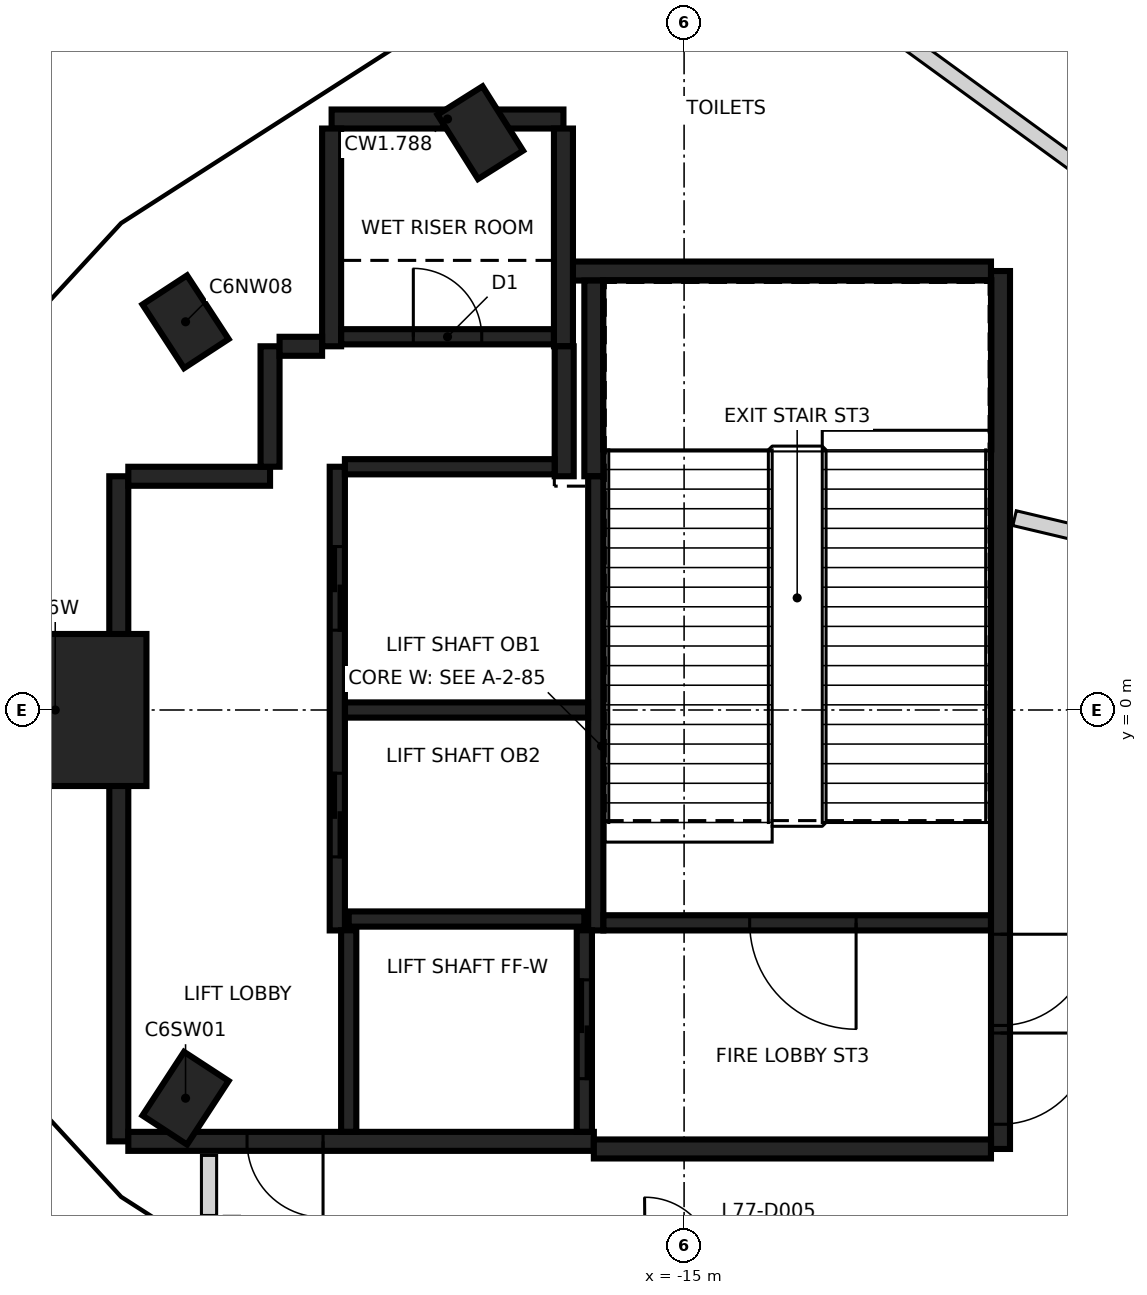
"""IFC4 building model, lengths in metres.
Left out: names, types, materials, properties, quantities, classifications, styles, units other than length and angle.
Written with IfcOpenShell. Run it as: python <this file> out.ifc"""

import sys

from ifc_helpers import new_model, si_unit, direction, frame, frame_2d, origin, origin_2d, place, context, subcontext, project, spatial, rectangle, extrude, element, fill, save


model = new_model("IFC4")
c1 = context("Model", 3, precision=1e-05, world=origin(), true_north=direction((0.0, 1.0)))
c2 = subcontext(c1, "Body", "Model", "MODEL_VIEW")
j1 = project(units=[si_unit("LENGTHUNIT", "METRE"), si_unit("PLANEANGLEUNIT", "RADIAN")], contexts=[c1])
p1 = place(None, origin())
s1 = spatial("IfcSite", under=j1, at=p1, CompositionType="ELEMENT")
p2 = place(p1, origin())
s2 = spatial("IfcBuilding", under=s1, at=p2, CompositionType="ELEMENT")
p3 = place(p2, frame((0.0, 0.0, 306.6)))
s3 = spatial("IfcBuildingStorey", under=s2, at=p3, CompositionType="ELEMENT", Elevation=306.6)
for number, where, z_axis, x_axis in (
    (1, (-17.681, 7.595, -0.35), (0.0, 0.0, 1.0), (-0.533, 0.846, 0.0)),
    (2, (-21.559, 5.107, -0.35), (0.0, 0.0, 1.0), (-0.547, 0.837, 0.0)),
    (3, (-21.559, -5.107, -0.35), (0.0, 0.0, 1.0), (0.547, 0.837, 0.0)),
):
    element("IfcColumn", number, at=place(p3, frame(where, z_axis=z_axis, x_axis=x_axis)), inside=s3, PredefinedType="COLUMN", context=c2, shape_type="SweptSolid", body=[
        extrude(rectangle(XDim=1.0, YDim=0.7, at=origin_2d()), origin(), (0.0, 0.0, 1.0), 6.0),
    ])
p4 = place(p3, frame((-23.273, 0.0, -0.35), z_axis=(0.0, 0.0, 1.0), x_axis=(1.0, 0.0, 0.0)))
e4 = element("IfcColumn", 4, at=p4, inside=s3, PredefinedType="COLUMN", context=c2, shape_type="SweptSolid", body=[
    extrude(rectangle(XDim=2.4, YDim=2.0, at=origin_2d()), origin(), (0.0, 0.0, 1.0), 6.0),
])
p5 = place(p3, frame((-10.837, 5.775, 0.0), z_axis=(0.0, 0.0, 1.0), x_axis=(0.0, -1.0, 0.0)))
e5 = element("IfcWall", 5, at=p5, inside=s3, PredefinedType="SHEAR", context=c2, shape_type="SweptSolid", body=[
    extrude(rectangle(XDim=11.55, YDim=0.25, at=frame_2d((5.775, 0.0))), origin(), (0.0, 0.0, 1.0), 5.65),
])
p6 = place(p5, frame((10.025, 0.0, 0.0)))
e6 = element("IfcOpeningElement", 6, at=p6, cuts=e5, PredefinedType="OPENING", context=c2, shape_type="SweptSolid", body=[
    extrude(rectangle(XDim=1.2, YDim=2.1, at=frame_2d((0.6, 1.05))), frame((0.0, 0.135, 0.0), z_axis=(0.0, -1.0, 0.0), x_axis=(1.0, 0.0, 0.0)), (0.0, 0.0, 1.0), 0.27),
])
p7 = place(p5, frame((8.725, 0.0, 0.0)))
e7 = element("IfcOpeningElement", 7, at=p7, cuts=e5, PredefinedType="OPENING", context=c2, shape_type="SweptSolid", body=[
    extrude(rectangle(XDim=1.2, YDim=2.1, at=frame_2d((0.6, 1.05))), frame((0.0, 0.135, 0.0), z_axis=(0.0, -1.0, 0.0), x_axis=(1.0, 0.0, 0.0)), (0.0, 0.0, 1.0), 0.27),
])
p8 = place(p3, frame((-22.437, -5.675, 0.0), z_axis=(0.0, 0.0, 1.0), x_axis=(0.0, 1.0, 0.0)))
e8 = element("IfcWall", 8, at=p8, inside=s3, PredefinedType="SHEAR", context=c2, shape_type="SweptSolid", body=[
    extrude(rectangle(XDim=8.75, YDim=0.25, at=frame_2d((4.375, 0.0))), origin(), (0.0, 0.0, 1.0), 5.65),
])
p9 = place(p3, frame((-16.187, -5.675, 0.0), z_axis=(0.0, 0.0, 1.0), x_axis=(-1.0, 0.0, 0.0)))
e9 = element("IfcWall", 9, at=p9, inside=s3, PredefinedType="SHEAR", context=c2, shape_type="SweptSolid", body=[
    extrude(rectangle(XDim=6.125, YDim=0.25, at=frame_2d((3.062, 0.0))), origin(), (0.0, 0.0, 1.0), 5.65),
])
p10 = place(p9, frame((3.563, 0.0, 0.0)))
e10 = element("IfcOpeningElement", 10, at=p10, cuts=e9, PredefinedType="OPENING", context=c2, shape_type="SweptSolid", body=[
    extrude(rectangle(XDim=1.0, YDim=2.1, at=frame_2d((0.5, 1.05))), frame((0.0, 0.135, 0.0), z_axis=(0.0, -1.0, 0.0), x_axis=(1.0, 0.0, 0.0)), (0.0, 0.0, 1.0), 0.27),
])
p11 = place(p3, frame((-10.963, -5.775, 0.0), z_axis=(0.0, 0.0, 1.0), x_axis=(-1.0, 0.0, 0.0)))
e11 = element("IfcWall", 11, at=p11, inside=s3, PredefinedType="SHEAR", context=c2, shape_type="SweptSolid", body=[
    extrude(rectangle(XDim=5.225, YDim=0.25, at=frame_2d((2.612, 0.0))), origin(), (0.0, 0.0, 1.0), 5.65),
])
p12 = place(p3, frame((-16.472, 5.775, 0.0), z_axis=(0.0, 0.0, 1.0), x_axis=(1.0, 0.0, 0.0)))
e12 = element("IfcWall", 12, at=p12, inside=s3, PredefinedType="SHEAR", context=c2, shape_type="SweptSolid", body=[
    extrude(rectangle(XDim=5.51, YDim=0.25, at=frame_2d((2.755, 0.0))), origin(), (0.0, 0.0, 1.0), 5.65),
])
p13 = place(p3, frame((-19.637, 7.775, 0.0), z_axis=(0.0, 0.0, 1.0), x_axis=(1.0, 0.0, 0.0)))
e13 = element("IfcWall", 13, at=p13, inside=s3, PredefinedType="SHEAR", context=c2, shape_type="SweptSolid", body=[
    extrude(rectangle(XDim=3.05, YDim=0.25, at=frame_2d((1.525, 0.0))), origin(), (0.0, 0.0, 1.0), 5.65),
])
for number, where, z_axis, x_axis in (
    (14, (-16.587, 7.65, 0.0), (0.0, 0.0, 1.0), (0.0, -1.0, 0.0)),
    (15, (-19.637, 4.785, 0.0), (0.0, 0.0, 1.0), (0.0, 1.0, 0.0)),
):
    element("IfcWall", number, at=place(p3, frame(where, z_axis=z_axis, x_axis=x_axis)), inside=s3, PredefinedType="SHEAR", context=c2, shape_type="SweptSolid", body=[
        extrude(rectangle(XDim=2.865, YDim=0.25, at=frame_2d((1.432, 0.0))), origin(), (0.0, 0.0, 1.0), 5.65),
    ])
p14 = place(p3, frame((-16.187, 3.075, 0.0), z_axis=(0.0, 0.0, 1.0), x_axis=(0.0, 1.0, 0.0)))
e16 = element("IfcWall", 16, at=p14, inside=s3, PredefinedType="SHEAR", context=c2, shape_type="SweptSolid", body=[
    extrude(rectangle(XDim=2.575, YDim=0.25, at=frame_2d((1.287, 0.0))), origin(), (0.0, 0.0, 1.0), 5.65),
])
p15 = place(p3, frame((-22.312, 3.075, 0.0), z_axis=(0.0, 0.0, 1.0), x_axis=(1.0, 0.0, 0.0)))
e17 = element("IfcWall", 17, at=p15, inside=s3, PredefinedType="SHEAR", context=c2, shape_type="SweptSolid", body=[
    extrude(rectangle(XDim=1.865, YDim=0.25, at=frame_2d((0.932, 0.0))), origin(), (0.0, 0.0, 1.0), 5.65),
])
p16 = place(p3, frame((-16.577, 4.785, 0.0), z_axis=(0.0, 0.0, 1.0), x_axis=(0.0, -1.0, 0.0)))
e18 = element("IfcWall", 18, at=p16, inside=s3, PredefinedType="SHEAR", context=c2, shape_type="SweptSolid", body=[
    extrude(rectangle(XDim=1.71, YDim=0.25, at=frame_2d((0.855, 0.0))), origin(), (0.0, 0.0, 1.0), 5.65),
])
p17 = place(p3, frame((-20.447, 3.2, 0.0), z_axis=(0.0, 0.0, 1.0), x_axis=(0.0, 1.0, 0.0)))
e19 = element("IfcWall", 19, at=p17, inside=s3, PredefinedType="SHEAR", context=c2, shape_type="SweptSolid", body=[
    extrude(rectangle(XDim=1.584, YDim=0.25, at=frame_2d((0.792, 0.0))), origin(), (0.0, 0.0, 1.0), 5.65),
])
p18 = place(p3, frame((-20.322, 4.785, 0.0), z_axis=(0.0, 0.0, 1.0), x_axis=(1.0, 0.0, 0.0)))
e20 = element("IfcWall", 20, at=p18, inside=s3, PredefinedType="SHEAR", context=c2, shape_type="SweptSolid", body=[
    extrude(rectangle(XDim=0.559, YDim=0.25, at=frame_2d((0.28, 0.0))), origin(), (0.0, 0.0, 1.0), 5.65),
])
p19 = place(p3, frame((-16.162, 3.074, 0.0), z_axis=(0.0, 0.0, 1.0), x_axis=(0.0, -1.0, 0.0)))
e21 = element("IfcWall", 21, at=p19, inside=s3, PredefinedType="SHEAR", context=c2, shape_type="SweptSolid", body=[
    extrude(rectangle(XDim=5.974, YDim=0.2, at=frame_2d((2.987, 0.0))), origin(), (0.0, 0.0, 1.0), 5.65),
])
p20 = place(p3, frame((-19.562, -2.9, 0.0), z_axis=(0.0, 0.0, 1.0), x_axis=(0.0, 1.0, 0.0)))
e22 = element("IfcWall", 22, at=p20, inside=s3, PredefinedType="SHEAR", context=c2, shape_type="SweptSolid", body=[
    extrude(rectangle(XDim=6.1, YDim=0.2, at=frame_2d((3.05, 0.0))), origin(), (0.0, 0.0, 1.0), 5.65),
])
p21 = place(p20, frame((3.95, 0.0, 0.0)))
e23 = element("IfcOpeningElement", 23, at=p21, cuts=e22, PredefinedType="OPENING", context=c2, shape_type="SweptSolid", body=[
    extrude(rectangle(XDim=1.1, YDim=2.1, at=frame_2d((0.55, 1.05))), frame((0.0, 0.11, 0.0), z_axis=(0.0, -1.0, 0.0), x_axis=(1.0, 0.0, 0.0)), (0.0, 0.0, 1.0), 0.22),
])
p22 = place(p20, frame((0.968, 0.0, 0.0)))
e24 = element("IfcOpeningElement", 24, at=p22, cuts=e22, PredefinedType="OPENING", context=c2, shape_type="SweptSolid", body=[
    extrude(rectangle(XDim=1.1, YDim=2.1, at=frame_2d((0.55, 1.05))), frame((0.0, 0.11, 0.0), z_axis=(0.0, -1.0, 0.0), x_axis=(1.0, 0.0, 0.0)), (0.0, 0.0, 1.0), 0.22),
])
p23 = place(p3, frame((-10.963, -2.8, 0.0), z_axis=(0.0, 0.0, 1.0), x_axis=(-1.0, 0.0, 0.0)))
e25 = element("IfcWall", 25, at=p23, inside=s3, PredefinedType="SHEAR", context=c2, shape_type="SweptSolid", body=[
    extrude(rectangle(XDim=5.098, YDim=0.2, at=frame_2d((2.549, 0.0))), origin(), (0.0, 0.0, 1.0), 5.65),
])
p24 = place(p23, frame((1.774, 0.0, 0.0)))
e26 = element("IfcOpeningElement", 26, at=p24, cuts=e25, PredefinedType="OPENING", context=c2, shape_type="SweptSolid", body=[
    extrude(rectangle(XDim=1.4, YDim=2.1, at=frame_2d((0.7, 1.05))), frame((0.0, 0.11, 0.0), z_axis=(0.0, -1.0, 0.0), x_axis=(1.0, 0.0, 0.0)), (0.0, 0.0, 1.0), 0.22),
])
p25 = place(p3, frame((-16.263, 0.0, 0.0), z_axis=(0.0, 0.0, 1.0), x_axis=(-1.0, 0.0, 0.0)))
e27 = element("IfcWall", 27, at=p25, inside=s3, PredefinedType="SHEAR", context=c2, shape_type="SweptSolid", body=[
    extrude(rectangle(XDim=3.198, YDim=0.2, at=frame_2d((1.599, 0.0))), origin(), (0.0, 0.0, 1.0), 5.65),
])
p26 = place(p3, frame((-19.511, 4.91, 0.0), z_axis=(0.0, 0.0, 1.0), x_axis=(1.0, 0.0, 0.0)))
e28 = element("IfcWall", 28, at=p26, inside=s3, PredefinedType="SHEAR", context=c2, shape_type="SweptSolid", body=[
    extrude(rectangle(XDim=2.798, YDim=0.2, at=frame_2d((1.399, 0.0))), origin(), (0.0, 0.0, 1.0), 5.65),
])
p27 = place(p26, frame((0.949, 0.0, 0.0)))
e29 = element("IfcOpeningElement", 29, at=p27, cuts=e28, PredefinedType="OPENING", context=c2, shape_type="SweptSolid", body=[
    extrude(rectangle(XDim=0.9, YDim=2.1, at=frame_2d((0.45, 1.05))), frame((0.0, 0.11, 0.0), z_axis=(0.0, -1.0, 0.0), x_axis=(1.0, 0.0, 0.0)), (0.0, 0.0, 1.0), 0.22),
])
p28 = place(p3, frame((-19.462, 3.2, 0.0), z_axis=(0.0, 0.0, 1.0), x_axis=(1.0, 0.0, 0.0)))
e30 = element("IfcWall", 30, at=p28, inside=s3, PredefinedType="SHEAR", context=c2, shape_type="SweptSolid", body=[
    extrude(rectangle(XDim=2.759, YDim=0.2, at=frame_2d((1.379, 0.0))), origin(), (0.0, 0.0, 1.0), 5.65),
])
p29 = place(p3, frame((-19.412, -2.75, 0.0), z_axis=(0.0, 0.0, 1.0), x_axis=(1.0, 0.0, 0.0)))
e31 = element("IfcWall", 31, at=p29, inside=s3, PredefinedType="SHEAR", context=c2, shape_type="SweptSolid", body=[
    extrude(rectangle(XDim=3.1, YDim=0.2, at=frame_2d((1.55, 0.0))), origin(), (0.0, 0.0, 1.0), 5.65),
])
p30 = place(p3, frame((-16.312, -2.898, 0.0), z_axis=(0.0, 0.0, 1.0), x_axis=(0.0, -1.0, 0.0)))
e32 = element("IfcWall", 32, at=p30, inside=s3, PredefinedType="SHEAR", context=c2, shape_type="SweptSolid", body=[
    extrude(rectangle(XDim=2.651, YDim=0.2, at=frame_2d((1.325, 0.0))), origin(), (0.0, 0.0, 1.0), 5.65),
])
p31 = place(p30, frame((0.652, 0.0, 0.0)))
e33 = element("IfcOpeningElement", 33, at=p31, cuts=e32, PredefinedType="OPENING", context=c2, shape_type="SweptSolid", body=[
    extrude(rectangle(XDim=1.3, YDim=2.1, at=frame_2d((0.65, 1.05))), frame((0.0, 0.11, 0.0), z_axis=(0.0, -1.0, 0.0), x_axis=(1.0, 0.0, 0.0)), (0.0, 0.0, 1.0), 0.22),
])
p32 = place(p3, frame((-19.412, -5.549, 0.0), z_axis=(0.0, 0.0, 1.0), x_axis=(0.0, 1.0, 0.0)))
e34 = element("IfcWall", 34, at=p32, inside=s3, PredefinedType="SHEAR", context=c2, shape_type="SweptSolid", body=[
    extrude(rectangle(XDim=2.651, YDim=0.2, at=frame_2d((1.325, 0.0))), origin(), (0.0, 0.0, 1.0), 5.65),
])
p33 = place(p3, frame((-21.25, -6.65, 0.0), z_axis=(0.0, 0.0, 1.0), x_axis=(0.0, 1.0, 0.0)))
e35 = element("IfcWall", 35, at=p33, inside=s3, PredefinedType="PARTITIONING", context=c2, shape_type="SweptSolid", body=[
    extrude(rectangle(XDim=0.79, YDim=0.2, at=frame_2d((0.395, 0.0))), origin(), (0.0, 0.0, 1.0), 5.65),
])
p34 = place(p3, frame((-15.114, 11.004, 0.0), z_axis=(0.0, 0.0, 1.0), x_axis=(0.808410288659, -0.58861940606, 0.0)))
e36 = element("IfcWall", 36, at=p34, inside=s3, PredefinedType="PARTITIONING", context=c2, shape_type="SweptSolid", body=[
    extrude(rectangle(XDim=14.782, YDim=0.2, at=frame_2d((7.391, 0.0))), origin(), (0.0, 0.0, 1.0), 5.65),
])
p35 = place(p3, frame((-10.78, -13.609, 0.0), z_axis=(0.0, 0.0, 1.0), x_axis=(0.620923442864, 0.783871212702, 0.0)))
e37 = element("IfcWall", 37, at=p35, inside=s3, PredefinedType="PARTITIONING", context=c2, shape_type="SweptSolid", body=[
    extrude(rectangle(XDim=13.469, YDim=0.2, at=frame_2d((6.735, 0.0))), origin(), (0.0, 0.0, 1.0), 5.65),
])
p36 = place(p35, frame((6.283, 0.0, 0.0)))
e38 = element("IfcOpeningElement", 38, at=p36, cuts=e37, PredefinedType="OPENING", context=c2, shape_type="SweptSolid", body=[
    extrude(rectangle(XDim=1.0, YDim=2.1, at=frame_2d((0.5, 1.05))), frame((0.0, 0.11, 0.0), z_axis=(0.0, -1.0, 0.0), x_axis=(1.0, 0.0, 0.0)), (0.0, 0.0, 1.0), 0.22),
])
p37 = place(p3, frame((-10.652, 2.524, 0.0), z_axis=(0.0, 0.0, 1.0), x_axis=(0.97307682679, -0.230480995236, 0.0)))
e39 = element("IfcWall", 39, at=p37, inside=s3, PredefinedType="PARTITIONING", context=c2, shape_type="SweptSolid", body=[
    extrude(rectangle(XDim=7.078, YDim=0.2, at=frame_2d((3.539, 0.0))), origin(), (0.0, 0.0, 1.0), 5.65),
])
p38 = place(p37, frame((1.349, 0.0, 0.0)))
e40 = element("IfcOpeningElement", 40, at=p38, cuts=e39, PredefinedType="OPENING", context=c2, shape_type="SweptSolid", body=[
    extrude(rectangle(XDim=0.8, YDim=2.1, at=frame_2d((0.4, 1.05))), frame((0.0, 0.11, 0.0), z_axis=(0.0, -1.0, 0.0), x_axis=(1.0, 0.0, 0.0)), (0.0, 0.0, 1.0), 0.22),
])
p39 = place(p37, frame((4.842, 0.0, 0.0)))
e41 = element("IfcOpeningElement", 41, at=p39, cuts=e39, PredefinedType="OPENING", context=c2, shape_type="SweptSolid", body=[
    extrude(rectangle(XDim=0.9, YDim=2.1, at=frame_2d((0.45, 1.05))), frame((0.0, 0.11, 0.0), z_axis=(0.0, -1.0, 0.0), x_axis=(1.0, 0.0, 0.0)), (0.0, 0.0, 1.0), 0.22),
])
p40 = place(p3, frame((-9.958, -7.055, 0.0), z_axis=(0.0, 0.0, 1.0), x_axis=(0.83844573603, 0.544985089459, 0.0)))
e42 = element("IfcWall", 42, at=p40, inside=s3, PredefinedType="PARTITIONING", context=c2, shape_type="SweptSolid", body=[
    extrude(rectangle(XDim=5.263, YDim=0.2, at=frame_2d((2.631, 0.0))), origin(), (0.0, 0.0, 1.0), 5.65),
])
p41 = place(p31, origin())
e43 = element("IfcDoor", 43, at=p41, inside=s3, OperationType="SLIDING_TO_LEFT", PredefinedType="DOOR", context=c2, shape_type="SweptSolid", body=[
    extrude(rectangle(XDim=1.3, YDim=2.1, at=frame_2d((0.65, 1.05))), frame((0.0, 0.025, 0.0), z_axis=(0.0, -1.0, 0.0), x_axis=(1.0, 0.0, 0.0)), (0.0, 0.0, 1.0), 0.05),
])
fill(e33, e43)
p42 = place(p21, origin())
e44 = element("IfcDoor", 44, at=p42, inside=s3, OperationType="DOUBLE_DOOR_SLIDING", PredefinedType="DOOR", context=c2, shape_type="SweptSolid", body=[
    extrude(rectangle(XDim=1.1, YDim=2.1, at=frame_2d((0.55, 1.05))), frame((0.0, 0.025, 0.0), z_axis=(0.0, -1.0, 0.0), x_axis=(1.0, 0.0, 0.0)), (0.0, 0.0, 1.0), 0.05),
])
fill(e23, e44)
p43 = place(p22, origin())
e45 = element("IfcDoor", 45, at=p43, inside=s3, OperationType="DOUBLE_DOOR_SLIDING", PredefinedType="DOOR", context=c2, shape_type="SweptSolid", body=[
    extrude(rectangle(XDim=1.1, YDim=2.1, at=frame_2d((0.55, 1.05))), frame((0.0, 0.025, 0.0), z_axis=(0.0, -1.0, 0.0), x_axis=(1.0, 0.0, 0.0)), (0.0, 0.0, 1.0), 0.05),
])
fill(e24, e45)
p44 = place(p10, origin())
e46 = element("IfcDoor", 46, at=p44, inside=s3, OperationType="SINGLE_SWING_LEFT", PredefinedType="DOOR", context=c2, shape_type="SweptSolid", body=[
    extrude(rectangle(XDim=1.0, YDim=2.1, at=frame_2d((0.5, 1.05))), frame((0.0, 0.025, 0.0), z_axis=(0.0, -1.0, 0.0), x_axis=(1.0, 0.0, 0.0)), (0.0, 0.0, 1.0), 0.05),
])
fill(e10, e46)
p45 = place(p6, origin())
e47 = element("IfcDoor", 47, at=p45, inside=s3, OperationType="SINGLE_SWING_LEFT", PredefinedType="DOOR", context=c2, shape_type="SweptSolid", body=[
    extrude(rectangle(XDim=1.2, YDim=2.1, at=frame_2d((0.6, 1.05))), frame((0.0, 0.025, 0.0), z_axis=(0.0, -1.0, 0.0), x_axis=(1.0, 0.0, 0.0)), (0.0, 0.0, 1.0), 0.05),
])
fill(e6, e47)
p46 = place(p7, origin())
e48 = element("IfcDoor", 48, at=p46, inside=s3, OperationType="SINGLE_SWING_RIGHT", PredefinedType="DOOR", context=c2, shape_type="SweptSolid", body=[
    extrude(rectangle(XDim=1.2, YDim=2.1, at=frame_2d((0.6, 1.05))), frame((0.0, 0.025, 0.0), z_axis=(0.0, -1.0, 0.0), x_axis=(1.0, 0.0, 0.0)), (0.0, 0.0, 1.0), 0.05),
])
fill(e7, e48)
p47 = place(p24, origin())
e49 = element("IfcDoor", 49, at=p47, inside=s3, OperationType="SINGLE_SWING_LEFT", PredefinedType="DOOR", context=c2, shape_type="SweptSolid", body=[
    extrude(rectangle(XDim=1.4, YDim=2.1, at=frame_2d((0.7, 1.05))), frame((0.0, 0.025, 0.0), z_axis=(0.0, -1.0, 0.0), x_axis=(1.0, 0.0, 0.0)), (0.0, 0.0, 1.0), 0.05),
])
fill(e26, e49)
p48 = place(p27, origin())
e50 = element("IfcDoor", 50, at=p48, inside=s3, OperationType="SINGLE_SWING_RIGHT", PredefinedType="DOOR", context=c2, shape_type="SweptSolid", body=[
    extrude(rectangle(XDim=0.9, YDim=2.1, at=frame_2d((0.45, 1.05))), frame((0.0, 0.025, 0.0), z_axis=(0.0, -1.0, 0.0), x_axis=(1.0, 0.0, 0.0)), (0.0, 0.0, 1.0), 0.05),
])
fill(e29, e50)
save(model, sys.argv[1])
